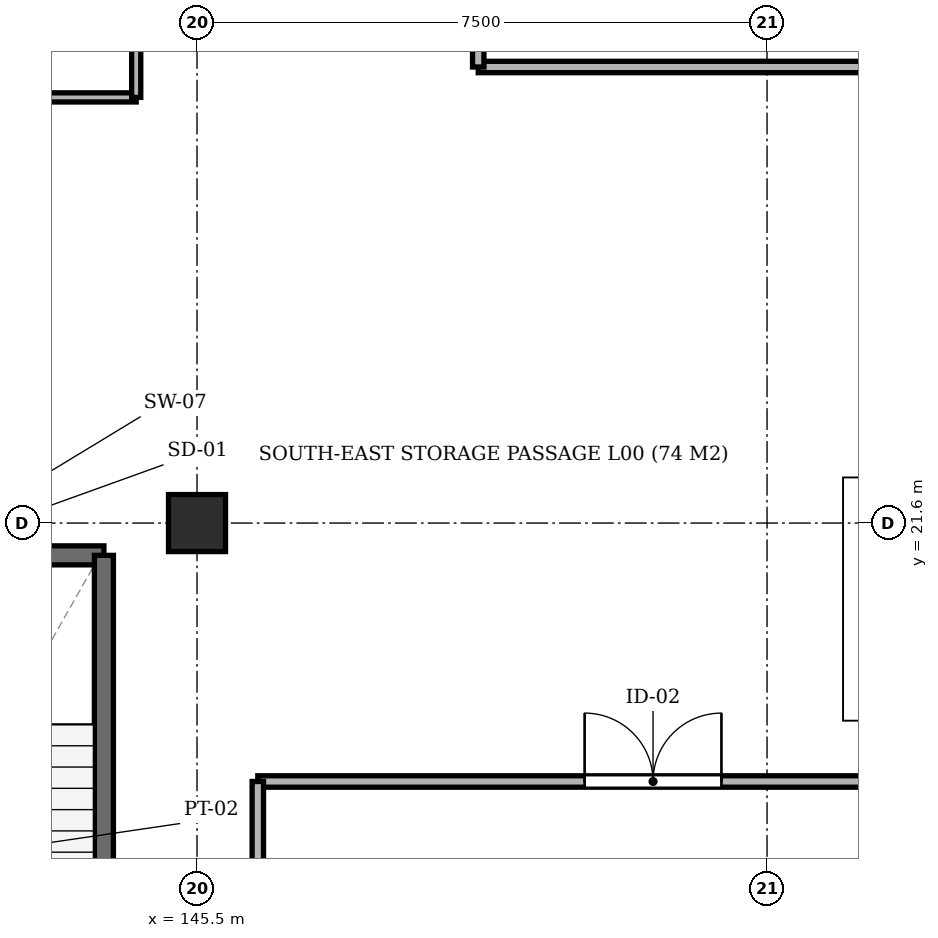
"""IFC4 building model, lengths in metres.
Left out: names, types, materials, properties, quantities, classifications, styles, units other than length and angle.
Written with IfcOpenShell. Run it as: python <this file> out.ifc"""

import sys

from ifc_helpers import new_model, si_unit, direction, frame, frame_2d, origin, origin_2d, place, context, subcontext, project, spatial, rectangle, extrude, element, fill, save


model = new_model("IFC4")
c1 = context("Model", 3, precision=1e-05, world=origin(), true_north=direction((0.0, 1.0)))
c2 = subcontext(c1, "Body", "Model", "MODEL_VIEW")
j1 = project(units=[si_unit("LENGTHUNIT", "METRE"), si_unit("PLANEANGLEUNIT", "RADIAN")], contexts=[c1])
p1 = place(None, origin())
s1 = spatial("IfcSite", under=j1, at=p1, CompositionType="ELEMENT")
p2 = place(p1, origin())
s2 = spatial("IfcBuilding", under=s1, at=p2, CompositionType="ELEMENT")
p3 = place(p2, origin())
s3 = spatial("IfcBuildingStorey", under=s2, at=p3, CompositionType="ELEMENT", Elevation=0.0)
p4 = place(p3, frame((145.5, 21.6, -0.35), z_axis=(0.0, 0.0, 1.0), x_axis=(1.0, 0.0, 0.0)))
e1 = element("IfcColumn", 1, at=p4, inside=s3, PredefinedType="COLUMN", context=c2, shape_type="SweptSolid", body=[
    extrude(rectangle(XDim=0.75, YDim=0.75, at=origin_2d()), origin(), (0.0, 0.0, 1.0), 4.65),
])
p5 = place(p3, frame((144.275, 21.175, 0.0), z_axis=(0.0, 0.0, 1.0), x_axis=(-1.0, 0.0, 0.0)))
e2 = element("IfcWall", 2, at=p5, inside=s3, PredefinedType="SHEAR", context=c2, shape_type="SweptSolid", body=[
    extrude(rectangle(XDim=5.05, YDim=0.25, at=frame_2d((2.525, 0.0))), origin(), (0.0, 0.0, 1.0), 4.3),
])
p6 = place(p5, frame((1.875, 0.0, 0.0)))
e3 = element("IfcOpeningElement", 3, at=p6, cuts=e2, PredefinedType="OPENING", context=c2, shape_type="SweptSolid", body=[
    extrude(rectangle(XDim=1.3, YDim=2.2, at=frame_2d((0.65, 1.1))), frame((0.0, 0.137, 0.0), z_axis=(0.0, -1.0, 0.0), x_axis=(1.0, 0.0, 0.0)), (0.0, 0.0, 1.0), 0.274),
])
p7 = place(p3, frame((144.275, 12.475, 0.0), z_axis=(0.0, 0.0, 1.0), x_axis=(0.0, 1.0, 0.0)))
e4 = element("IfcWall", 4, at=p7, inside=s3, PredefinedType="SHEAR", context=c2, shape_type="SweptSolid", body=[
    extrude(rectangle(XDim=8.7, YDim=0.25, at=frame_2d((4.35, 0.0))), origin(), (0.0, 0.0, 1.0), 4.3),
])
p8 = place(p3, frame((146.3, 18.2, 0.0), z_axis=(0.0, 0.0, 1.0), x_axis=(1.0, 0.0, 0.0)))
e5 = element("IfcWall", 5, at=p8, inside=s3, PredefinedType="PARTITIONING", context=c2, shape_type="SweptSolid", body=[
    extrude(rectangle(XDim=17.5, YDim=0.15, at=frame_2d((8.75, 0.0))), origin(), (0.0, 0.0, 1.0), 3.88),
])
p9 = place(p8, frame((4.3, 0.0, 0.0)))
e6 = element("IfcOpeningElement", 6, at=p9, cuts=e5, PredefinedType="OPENING", context=c2, shape_type="SweptSolid", body=[
    extrude(rectangle(XDim=1.8, YDim=2.25, at=frame_2d((0.9, 1.125))), frame((0.0, 0.087, 0.0), z_axis=(0.0, -1.0, 0.0), x_axis=(1.0, 0.0, 0.0)), (0.0, 0.0, 1.0), 0.174),
])
p10 = place(p3, frame((146.3, 4.2, 0.0), z_axis=(0.0, 0.0, 1.0), x_axis=(0.0, 1.0, 0.0)))
e7 = element("IfcWall", 7, at=p10, inside=s3, PredefinedType="PARTITIONING", context=c2, shape_type="SweptSolid", body=[
    extrude(rectangle(XDim=14.0, YDim=0.15, at=frame_2d((7.0, 0.0))), origin(), (0.0, 0.0, 1.0), 3.88),
])
p11 = place(p3, frame((149.2, 27.6, 0.0), z_axis=(0.0, 0.0, 1.0), x_axis=(1.0, 0.0, 0.0)))
e8 = element("IfcWall", 8, at=p11, inside=s3, PredefinedType="PARTITIONING", context=c2, shape_type="SweptSolid", body=[
    extrude(rectangle(XDim=10.6, YDim=0.15, at=frame_2d((5.3, 0.0))), origin(), (0.0, 0.0, 1.0), 3.88),
])
p12 = place(p3, frame((149.2, 27.6, 0.0), z_axis=(0.0, 0.0, 1.0), x_axis=(0.0, 1.0, 0.0)))
e9 = element("IfcWall", 9, at=p12, inside=s3, PredefinedType="PARTITIONING", context=c2, shape_type="SweptSolid", body=[
    extrude(rectangle(XDim=7.2, YDim=0.15, at=frame_2d((3.6, 0.0))), origin(), (0.0, 0.0, 1.0), 3.88),
])
p13 = place(p12, frame((3.05, 0.0, 0.0)))
e10 = element("IfcOpeningElement", 10, at=p13, cuts=e9, PredefinedType="OPENING", context=c2, shape_type="SweptSolid", body=[
    extrude(rectangle(XDim=1.1, YDim=2.15, at=frame_2d((0.55, 1.075))), frame((0.0, 0.087, 0.0), z_axis=(0.0, -1.0, 0.0), x_axis=(1.0, 0.0, 0.0)), (0.0, 0.0, 1.0), 0.174),
])
p14 = place(p3, frame((138.8, 27.2, 0.0), z_axis=(0.0, 0.0, 1.0), x_axis=(1.0, 0.0, 0.0)))
e11 = element("IfcWall", 11, at=p14, inside=s3, PredefinedType="PARTITIONING", context=c2, shape_type="SweptSolid", body=[
    extrude(rectangle(XDim=5.9, YDim=0.12, at=frame_2d((2.95, 0.0))), origin(), (0.0, 0.0, 1.0), 3.88),
])
p15 = place(p14, frame((2.425, 0.0, 0.0)))
e12 = element("IfcOpeningElement", 12, at=p15, cuts=e11, PredefinedType="OPENING", context=c2, shape_type="SweptSolid", body=[
    extrude(rectangle(XDim=1.05, YDim=2.15, at=frame_2d((0.525, 1.075))), frame((0.0, 0.072, 0.0), z_axis=(0.0, -1.0, 0.0), x_axis=(1.0, 0.0, 0.0)), (0.0, 0.0, 1.0), 0.144),
])
p16 = place(p3, frame((144.7, 27.2, 0.0), z_axis=(0.0, 0.0, 1.0), x_axis=(0.0, 1.0, 0.0)))
e13 = element("IfcWall", 13, at=p16, inside=s3, PredefinedType="PARTITIONING", context=c2, shape_type="SweptSolid", body=[
    extrude(rectangle(XDim=23.0, YDim=0.12, at=frame_2d((11.5, 0.0))), origin(), (0.0, 0.0, 1.0), 3.88),
])
p17 = place(p9, origin())
e14 = element("IfcDoor", 14, at=p17, inside=s3, OperationType="DOUBLE_DOOR_SINGLE_SWING", PredefinedType="DOOR", context=c2, shape_type="SweptSolid", body=[
    extrude(rectangle(XDim=1.8, YDim=2.25, at=frame_2d((0.9, 1.125))), frame((0.0, 0.025, 0.0), z_axis=(0.0, -1.0, 0.0), x_axis=(1.0, 0.0, 0.0)), (0.0, 0.0, 1.0), 0.05),
])
fill(e6, e14)
save(model, sys.argv[1])
